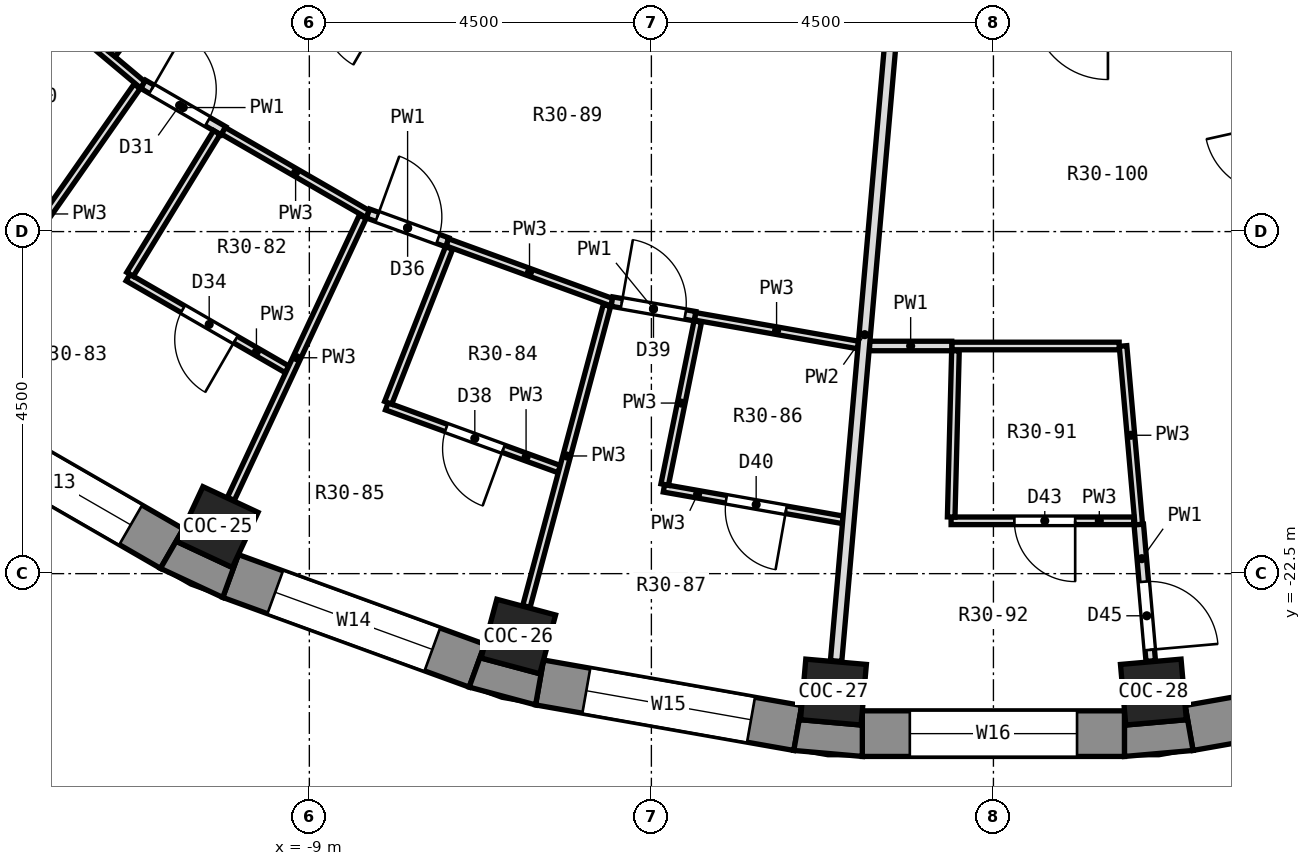
"""IFC4 building model, lengths in metres.
Left out: names, types, materials, properties, quantities, classifications, styles, units other than length and angle.
Written with IfcOpenShell. Run it as: python <this file> out.ifc"""

import sys

from ifc_helpers import new_model, si_unit, direction, frame, frame_2d, origin, origin_2d, place, context, subcontext, project, spatial, polyline, rectangle, outline, extrude, element, fill, save


model = new_model("IFC4")
c1 = context("Model", 3, precision=1e-05, world=origin(), true_north=direction((0.0, 1.0)))
c2 = subcontext(c1, "Body", "Model", "MODEL_VIEW")
j1 = project(units=[si_unit("LENGTHUNIT", "METRE"), si_unit("PLANEANGLEUNIT", "RADIAN")], contexts=[c1])
p1 = place(None, origin())
s1 = spatial("IfcSite", under=j1, at=p1, CompositionType="ELEMENT")
p2 = place(p1, origin())
s2 = spatial("IfcBuilding", under=s1, at=p2, CompositionType="ELEMENT")
p3 = place(p2, frame((0.0, 0.0, 210.3)))
s3 = spatial("IfcBuildingStorey", under=s2, at=p3, CompositionType="ELEMENT", Elevation=210.3)
for number, where, z_axis, x_axis in (
    (1, (-10.206, -21.887, 0.0), (0.0, 0.0, 1.0), (-0.423, -0.906, 0.0)),
    (2, (-6.25, -23.327, 0.0), (0.0, 0.0, 1.0), (-0.259, -0.966, 0.0)),
    (3, (-2.105, -24.058, 0.0), (0.0, 0.0, 1.0), (-0.087, -0.996, 0.0)),
    (4, (2.105, -24.058, 0.0), (0.0, 0.0, 1.0), (0.087, -0.996, 0.0)),
):
    element("IfcColumn", number, at=place(p3, frame(where, z_axis=z_axis, x_axis=x_axis)), inside=s3, PredefinedType="COLUMN", context=c2, shape_type="SweptSolid", body=[
        extrude(rectangle(XDim=0.8, YDim=0.8, at=origin_2d()), origin(), (0.0, 0.0, 1.0), 3.3),
    ])
p4 = place(p3, frame((-13.796, -20.446, 0.0), z_axis=(0.0, 0.0, 1.0), x_axis=(0.86602648383, -0.499998129301, 0.0)))
e5 = element("IfcWall", 5, at=p4, inside=s3, PredefinedType="SOLIDWALL", context=c2, shape_type="SweptSolid", body=[
    extrude(rectangle(XDim=3.45, YDim=0.6, at=frame_2d((1.725, 0.0))), origin(), (0.0, 0.0, 1.0), 2.85),
])
p5 = place(p4, frame((0.625, 0.0, 0.9)))
e6 = element("IfcOpeningElement", 6, at=p5, cuts=e5, PredefinedType="OPENING", context=c2, shape_type="SweptSolid", body=[
    extrude(rectangle(XDim=2.2, YDim=1.8, at=frame_2d((1.1, 0.9))), frame((0.0, 0.312, 0.0), z_axis=(0.0, -1.0, 0.0), x_axis=(1.0, 0.0, 0.0)), (0.0, 0.0, 1.0), 0.624),
])
p6 = place(p3, frame((-10.036, -22.531, 0.0), z_axis=(0.0, 0.0, 1.0), x_axis=(0.93968799822, -0.342032843455, 0.0)))
e7 = element("IfcWall", 7, at=p6, inside=s3, PredefinedType="SOLIDWALL", context=c2, shape_type="SweptSolid", body=[
    extrude(rectangle(XDim=3.45, YDim=0.6, at=frame_2d((1.725, 0.0))), origin(), (0.0, 0.0, 1.0), 2.85),
])
p7 = place(p6, frame((0.625, 0.0, 0.9)))
e8 = element("IfcOpeningElement", 8, at=p7, cuts=e7, PredefinedType="OPENING", context=c2, shape_type="SweptSolid", body=[
    extrude(rectangle(XDim=2.2, YDim=1.8, at=frame_2d((1.1, 0.9))), frame((0.0, 0.312, 0.0), z_axis=(0.0, -1.0, 0.0), x_axis=(1.0, 0.0, 0.0)), (0.0, 0.0, 1.0), 0.624),
])
p8 = place(p3, frame((-5.971, -23.932, 0.0), z_axis=(0.0, 0.0, 1.0), x_axis=(0.984814892183, -0.173607684551, 0.0)))
e9 = element("IfcWall", 9, at=p8, inside=s3, PredefinedType="SOLIDWALL", context=c2, shape_type="SweptSolid", body=[
    extrude(rectangle(XDim=3.45, YDim=0.6, at=frame_2d((1.725, 0.0))), origin(), (0.0, 0.0, 1.0), 2.85),
])
p9 = place(p8, frame((0.625, 0.0, 0.9)))
e10 = element("IfcOpeningElement", 10, at=p9, cuts=e9, PredefinedType="OPENING", context=c2, shape_type="SweptSolid", body=[
    extrude(rectangle(XDim=2.2, YDim=1.8, at=frame_2d((1.1, 0.9))), frame((0.0, 0.312, 0.0), z_axis=(0.0, -1.0, 0.0), x_axis=(1.0, 0.0, 0.0)), (0.0, 0.0, 1.0), 0.624),
])
p10 = place(p3, frame((-1.725, -24.605, 0.0), z_axis=(0.0, 0.0, 1.0), x_axis=(1.0, 0.0, 0.0)))
e11 = element("IfcWall", 11, at=p10, inside=s3, PredefinedType="SOLIDWALL", context=c2, shape_type="SweptSolid", body=[
    extrude(rectangle(XDim=3.45, YDim=0.6, at=frame_2d((1.725, 0.0))), origin(), (0.0, 0.0, 1.0), 2.85),
])
p11 = place(p10, frame((0.625, 0.0, 0.9)))
e12 = element("IfcOpeningElement", 12, at=p11, cuts=e11, PredefinedType="OPENING", context=c2, shape_type="SweptSolid", body=[
    extrude(rectangle(XDim=2.2, YDim=1.8, at=frame_2d((1.1, 0.9))), frame((0.0, 0.312, 0.0), z_axis=(0.0, -1.0, 0.0), x_axis=(1.0, 0.0, 0.0)), (0.0, 0.0, 1.0), 0.624),
])
p12 = place(p3, frame((2.574, -24.531, 0.0), z_axis=(0.0, 0.0, 1.0), x_axis=(0.984814892183, 0.173607684551, 0.0)))
e13 = element("IfcWall", 13, at=p12, inside=s3, PredefinedType="SOLIDWALL", context=c2, shape_type="SweptSolid", body=[
    extrude(rectangle(XDim=3.45, YDim=0.6, at=frame_2d((1.725, 0.0))), origin(), (0.0, 0.0, 1.0), 2.85),
])
p13 = place(p12, frame((0.625, 0.0, 0.9)))
e14 = element("IfcOpeningElement", 14, at=p13, cuts=e13, PredefinedType="OPENING", context=c2, shape_type="SweptSolid", body=[
    extrude(rectangle(XDim=2.2, YDim=1.8, at=frame_2d((1.1, 0.9))), frame((0.0, 0.312, 0.0), z_axis=(0.0, -1.0, 0.0), x_axis=(1.0, 0.0, 0.0)), (0.0, 0.0, 1.0), 0.624),
])
p14 = place(p3, origin())
e15 = element("IfcWall", 15, at=p14, inside=s3, PredefinedType="SOLIDWALL", context=c2, shape_type="SweptSolid", body=[
    extrude(outline(polyline([(-10.139, -22.813), (-9.934, -22.249), (-10.013, -22.419), (-10.738, -22.081), (-10.659, -21.911), (-10.959, -22.431), (-10.139, -22.813)])), origin(), (0.0, 0.0, 1.0), 2.85),
])
p15 = place(p3, origin())
e16 = element("IfcWall", 16, at=p15, inside=s3, PredefinedType="SOLIDWALL", context=c2, shape_type="SweptSolid", body=[
    extrude(outline(polyline([(-6.023, -24.227), (-5.919, -23.636), (-5.968, -23.817), (-6.74, -23.61), (-6.692, -23.429), (-6.897, -23.993), (-6.023, -24.227)])), origin(), (0.0, 0.0, 1.0), 2.85),
])
p16 = place(p3, origin())
e17 = element("IfcWall", 17, at=p16, inside=s3, PredefinedType="SOLIDWALL", context=c2, shape_type="SweptSolid", body=[
    extrude(outline(polyline([(-2.626, -24.826), (-1.725, -24.905), (-1.725, -24.305), (-1.741, -24.491), (-2.538, -24.422), (-2.522, -24.235), (-2.626, -24.826)])), origin(), (0.0, 0.0, 1.0), 2.85),
])
p17 = place(p3, origin())
e18 = element("IfcWall", 18, at=p17, inside=s3, PredefinedType="SOLIDWALL", context=c2, shape_type="SweptSolid", body=[
    extrude(outline(polyline([(1.725, -24.905), (2.626, -24.826), (2.522, -24.235), (2.538, -24.422), (1.741, -24.491), (1.725, -24.305), (1.725, -24.905)])), origin(), (0.0, 0.0, 1.0), 2.85),
])
p18 = place(p3, frame((1.705, -19.505, 0.0), z_axis=(0.0, 0.0, 1.0), x_axis=(0.087875685813, -0.996131449078, 0.0)))
e19 = element("IfcWall", 19, at=p18, inside=s3, PredefinedType="PARTITIONING", context=c2, shape_type="SweptSolid", body=[
    extrude(rectangle(XDim=2.359, YDim=0.1, at=frame_2d((1.179, 0.0))), origin(), (0.0, 0.0, 1.0), 2.85),
])
p19 = place(p3, frame((1.912, -21.855, 0.0), z_axis=(0.0, 0.0, 1.0), x_axis=(0.08726107822, -0.99618547682, 0.0)))
e20 = element("IfcWall", 20, at=p19, inside=s3, PredefinedType="PARTITIONING", context=c2, shape_type="SweptSolid", body=[
    extrude(rectangle(XDim=1.802, YDim=0.125, at=frame_2d((0.901, 0.0))), origin(), (0.0, 0.0, 1.0), 2.85),
])
p20 = place(p19, frame((0.754, 0.0, 0.0)))
e21 = element("IfcOpeningElement", 21, at=p20, cuts=e20, PredefinedType="OPENING", context=c2, shape_type="SweptSolid", body=[
    extrude(rectangle(XDim=0.9, YDim=2.1, at=frame_2d((0.45, 1.05))), frame((0.0, 0.074, 0.0), z_axis=(0.0, -1.0, 0.0), x_axis=(1.0, 0.0, 0.0)), (0.0, 0.0, 1.0), 0.149),
])
p21 = place(p3, frame((-12.957, -14.589, 0.0), z_axis=(0.0, 0.0, 1.0), x_axis=(0.766099024104, -0.642722556993, 0.0)))
e22 = element("IfcWall", 22, at=p21, inside=s3, PredefinedType="PARTITIONING", context=c2, shape_type="SweptSolid", body=[
    extrude(rectangle(XDim=2.305, YDim=0.1, at=frame_2d((1.153, 0.0))), origin(), (0.0, 0.0, 1.0), 2.85),
])
p22 = place(p3, frame((-11.186, -16.062, 0.0), z_axis=(0.0, 0.0, 1.0), x_axis=(0.865261949816, -0.501320015759, 0.0)))
e23 = element("IfcWall", 23, at=p22, inside=s3, PredefinedType="PARTITIONING", context=c2, shape_type="SweptSolid", body=[
    extrude(rectangle(XDim=1.221, YDim=0.125, at=frame_2d((0.61, 0.0))), origin(), (0.0, 0.0, 1.0), 2.85),
])
p23 = place(p22, frame((0.129, 0.0, 0.0)))
e24 = element("IfcOpeningElement", 24, at=p23, cuts=e23, PredefinedType="OPENING", context=c2, shape_type="SweptSolid", body=[
    extrude(rectangle(XDim=0.85, YDim=2.1, at=frame_2d((0.425, 1.05))), frame((0.0, 0.074, 0.0), z_axis=(0.0, -1.0, 0.0), x_axis=(1.0, 0.0, 0.0)), (0.0, 0.0, 1.0), 0.149),
])
p24 = place(p3, frame((-11.385, -18.605, 0.0), z_axis=(0.0, 0.0, 1.0), x_axis=(0.866145191815, -0.499792463624, 0.0)))
e25 = element("IfcWall", 25, at=p24, inside=s3, PredefinedType="PARTITIONING", context=c2, shape_type="SweptSolid", body=[
    extrude(rectangle(XDim=2.415, YDim=0.1, at=frame_2d((1.208, 0.0))), origin(), (0.0, 0.0, 1.0), 2.85),
])
p25 = place(p24, frame((0.833, 0.0, 0.0)))
e26 = element("IfcOpeningElement", 26, at=p25, cuts=e25, PredefinedType="OPENING", context=c2, shape_type="SweptSolid", body=[
    extrude(rectangle(XDim=0.8, YDim=2.1, at=frame_2d((0.4, 1.05))), frame((0.0, 0.062, 0.0), z_axis=(0.0, -1.0, 0.0), x_axis=(1.0, 0.0, 0.0)), (0.0, 0.0, 1.0), 0.124),
])
p26 = place(p3, frame((-10.13, -16.674, 0.0), z_axis=(0.0, 0.0, 1.0), x_axis=(0.866104006239, -0.499863831834, 0.0)))
e27 = element("IfcWall", 27, at=p26, inside=s3, PredefinedType="PARTITIONING", context=c2, shape_type="SweptSolid", body=[
    extrude(rectangle(XDim=2.192, YDim=0.1, at=frame_2d((1.096, 0.0))), origin(), (0.0, 0.0, 1.0), 2.85),
])
p27 = place(p3, frame((-7.981, -20.299, 0.0), z_axis=(0.0, 0.0, 1.0), x_axis=(0.939692991858, -0.342019123812, 0.0)))
e28 = element("IfcWall", 28, at=p27, inside=s3, PredefinedType="PARTITIONING", context=c2, shape_type="SweptSolid", body=[
    extrude(rectangle(XDim=2.414, YDim=0.1, at=frame_2d((1.207, 0.0))), origin(), (0.0, 0.0, 1.0), 2.85),
])
p28 = place(p27, frame((0.832, 0.0, 0.0)))
e29 = element("IfcOpeningElement", 29, at=p28, cuts=e28, PredefinedType="OPENING", context=c2, shape_type="SweptSolid", body=[
    extrude(rectangle(XDim=0.8, YDim=2.1, at=frame_2d((0.4, 1.05))), frame((0.0, 0.062, 0.0), z_axis=(0.0, -1.0, 0.0), x_axis=(1.0, 0.0, 0.0)), (0.0, 0.0, 1.0), 0.124),
])
p29 = place(p3, frame((-7.186, -18.141, 0.0), z_axis=(0.0, 0.0, 1.0), x_axis=(0.939651079277, -0.342134256123, 0.0)))
e30 = element("IfcWall", 30, at=p29, inside=s3, PredefinedType="PARTITIONING", context=c2, shape_type="SweptSolid", body=[
    extrude(rectangle(XDim=2.305, YDim=0.1, at=frame_2d((1.152, 0.0))), origin(), (0.0, 0.0, 1.0), 2.85),
])
p30 = place(p3, frame((-8.228, -17.762, 0.0), z_axis=(0.0, 0.0, 1.0), x_axis=(0.939793423488, -0.341743063087, 0.0)))
e31 = element("IfcWall", 31, at=p30, inside=s3, PredefinedType="PARTITIONING", context=c2, shape_type="SweptSolid", body=[
    extrude(rectangle(XDim=1.109, YDim=0.125, at=frame_2d((0.554, 0.0))), origin(), (0.0, 0.0, 1.0), 2.85),
])
p31 = place(p30, frame((0.129, 0.0, 0.0)))
e32 = element("IfcOpeningElement", 32, at=p31, cuts=e31, PredefinedType="OPENING", context=c2, shape_type="SweptSolid", body=[
    extrude(rectangle(XDim=0.85, YDim=2.1, at=frame_2d((0.425, 1.05))), frame((0.0, 0.074, 0.0), z_axis=(0.0, -1.0, 0.0), x_axis=(1.0, 0.0, 0.0)), (0.0, 0.0, 1.0), 0.149),
])
p32 = place(p3, frame((-4.335, -21.377, 0.0), z_axis=(0.0, 0.0, 1.0), x_axis=(0.984797956456, -0.173703727534, 0.0)))
e33 = element("IfcWall", 33, at=p32, inside=s3, PredefinedType="PARTITIONING", context=c2, shape_type="SweptSolid", body=[
    extrude(rectangle(XDim=2.389, YDim=0.1, at=frame_2d((1.195, 0.0))), origin(), (0.0, 0.0, 1.0), 2.85),
])
p33 = place(p32, frame((0.832, 0.0, 0.0)))
e34 = element("IfcOpeningElement", 34, at=p33, cuts=e33, PredefinedType="OPENING", context=c2, shape_type="SweptSolid", body=[
    extrude(rectangle(XDim=0.8, YDim=2.1, at=frame_2d((0.4, 1.05))), frame((0.0, 0.062, 0.0), z_axis=(0.0, -1.0, 0.0), x_axis=(1.0, 0.0, 0.0)), (0.0, 0.0, 1.0), 0.124),
])
p34 = place(p3, frame((-3.927, -19.115, 0.0), z_axis=(0.0, 0.0, 1.0), x_axis=(0.984911838823, -0.173056839643, 0.0)))
e35 = element("IfcWall", 35, at=p34, inside=s3, PredefinedType="PARTITIONING", context=c2, shape_type="SweptSolid", body=[
    extrude(rectangle(XDim=2.18, YDim=0.1, at=frame_2d((1.09, 0.0))), origin(), (0.0, 0.0, 1.0), 2.85),
])
p35 = place(p3, frame((-5.019, -18.921, 0.0), z_axis=(0.0, 0.0, 1.0), x_axis=(0.984810132848, -0.173634680406, 0.0)))
e36 = element("IfcWall", 36, at=p35, inside=s3, PredefinedType="PARTITIONING", context=c2, shape_type="SweptSolid", body=[
    extrude(rectangle(XDim=1.109, YDim=0.125, at=frame_2d((0.555, 0.0))), origin(), (0.0, 0.0, 1.0), 2.85),
])
p36 = place(p35, frame((0.13, 0.0, 0.0)))
e37 = element("IfcOpeningElement", 37, at=p36, cuts=e36, PredefinedType="OPENING", context=c2, shape_type="SweptSolid", body=[
    extrude(rectangle(XDim=0.85, YDim=2.1, at=frame_2d((0.425, 1.05))), frame((0.0, 0.074, 0.0), z_axis=(0.0, -1.0, 0.0), x_axis=(1.0, 0.0, 0.0)), (0.0, 0.0, 1.0), 0.149),
])
p37 = place(p3, frame((-0.557, -21.805, 0.0), z_axis=(0.0, 0.0, 1.0), x_axis=(1.0, 0.0, 0.0)))
e38 = element("IfcWall", 38, at=p37, inside=s3, PredefinedType="PARTITIONING", context=c2, shape_type="SweptSolid", body=[
    extrude(rectangle(XDim=2.402, YDim=0.1, at=frame_2d((1.201, 0.0))), origin(), (0.0, 0.0, 1.0), 2.85),
])
p38 = place(p37, frame((0.833, 0.0, 0.0)))
e39 = element("IfcOpeningElement", 39, at=p38, cuts=e38, PredefinedType="OPENING", context=c2, shape_type="SweptSolid", body=[
    extrude(rectangle(XDim=0.8, YDim=2.1, at=frame_2d((0.4, 1.05))), frame((0.0, 0.062, 0.0), z_axis=(0.0, -1.0, 0.0), x_axis=(1.0, 0.0, 0.0)), (0.0, 0.0, 1.0), 0.124),
])
p39 = place(p3, frame((-0.548, -19.505, 0.0), z_axis=(0.0, 0.0, 1.0), x_axis=(1.0, 0.0, 0.0)))
e40 = element("IfcWall", 40, at=p39, inside=s3, PredefinedType="PARTITIONING", context=c2, shape_type="SweptSolid", body=[
    extrude(rectangle(XDim=2.202, YDim=0.1, at=frame_2d((1.101, 0.0))), origin(), (0.0, 0.0, 1.0), 2.85),
])
p40 = place(p3, frame((-1.63, -19.505, 0.0), z_axis=(0.0, 0.0, 1.0), x_axis=(1.0, 0.0, 0.0)))
e41 = element("IfcWall", 41, at=p40, inside=s3, PredefinedType="PARTITIONING", context=c2, shape_type="SweptSolid", body=[
    extrude(rectangle(XDim=1.082, YDim=0.125, at=frame_2d((0.541, 0.0))), origin(), (0.0, 0.0, 1.0), 2.85),
])
p41 = place(p3, frame((-11.593, -15.667, 0.0), z_axis=(0.0, 0.0, 1.0), x_axis=(0.594790535758, 0.803880724096, 0.0)))
e42 = element("IfcWall", 42, at=p41, inside=s3, PredefinedType="PARTITIONING", context=c2, shape_type="SweptSolid", body=[
    extrude(rectangle(XDim=4.33, YDim=0.1, at=frame_2d((2.165, 0.0))), origin(), (0.0, 0.0, 1.0), 2.85),
])
p42 = place(p41, frame((1.421, 0.0, 0.0)))
e43 = element("IfcOpeningElement", 43, at=p42, cuts=e42, PredefinedType="OPENING", context=c2, shape_type="SweptSolid", body=[
    extrude(rectangle(XDim=0.9, YDim=2.1, at=frame_2d((0.45, 1.05))), frame((0.0, 0.062, 0.0), z_axis=(0.0, -1.0, 0.0), x_axis=(1.0, 0.0, 0.0)), (0.0, 0.0, 1.0), 0.124),
])
p43 = place(p3, frame((-13.617, -19.447, 0.0), z_axis=(0.0, 0.0, 1.0), x_axis=(0.573606249772, 0.819131167898, 0.0)))
e44 = element("IfcWall", 44, at=p43, inside=s3, PredefinedType="PARTITIONING", context=c2, shape_type="SweptSolid", body=[
    extrude(rectangle(XDim=4.099, YDim=0.1, at=frame_2d((2.049, 0.0))), origin(), (0.0, 0.0, 1.0), 2.85),
])
p44 = place(p3, frame((-11.359, -18.562, 0.0), z_axis=(0.0, 0.0, 1.0), x_axis=(0.522122387349, 0.852870572026, 0.0)))
e45 = element("IfcWall", 45, at=p44, inside=s3, PredefinedType="PARTITIONING", context=c2, shape_type="SweptSolid", body=[
    extrude(rectangle(XDim=2.188, YDim=0.1, at=frame_2d((1.094, 0.0))), origin(), (0.0, 0.0, 1.0), 2.85),
])
p45 = place(p3, frame((-10.032, -21.516, 0.0), z_axis=(0.0, 0.0, 1.0), x_axis=(0.423514808753, 0.90588918018, 0.0)))
e46 = element("IfcWall", 46, at=p45, inside=s3, PredefinedType="PARTITIONING", context=c2, shape_type="SweptSolid", body=[
    extrude(rectangle(XDim=4.098, YDim=0.1, at=frame_2d((2.049, 0.0))), origin(), (0.0, 0.0, 1.0), 2.85),
])
p46 = place(p3, frame((-7.963, -20.252, 0.0), z_axis=(0.0, 0.0, 1.0), x_axis=(0.365959579046, 0.930630746593, 0.0)))
e47 = element("IfcWall", 47, at=p46, inside=s3, PredefinedType="PARTITIONING", context=c2, shape_type="SweptSolid", body=[
    extrude(rectangle(XDim=2.188, YDim=0.1, at=frame_2d((1.094, 0.0))), origin(), (0.0, 0.0, 1.0), 2.85),
])
p47 = place(p3, frame((-6.144, -22.931, 0.0), z_axis=(0.0, 0.0, 1.0), x_axis=(0.258608038295, 0.965982340692, 0.0)))
e48 = element("IfcWall", 48, at=p47, inside=s3, PredefinedType="PARTITIONING", context=c2, shape_type="SweptSolid", body=[
    extrude(rectangle(XDim=4.098, YDim=0.1, at=frame_2d((2.049, 0.0))), origin(), (0.0, 0.0, 1.0), 2.85),
])
p48 = place(p3, frame((-4.325, -21.328, 0.0), z_axis=(0.0, 0.0, 1.0), x_axis=(0.199033137994, 0.979992760167, 0.0)))
e49 = element("IfcWall", 49, at=p48, inside=s3, PredefinedType="PARTITIONING", context=c2, shape_type="SweptSolid", body=[
    extrude(rectangle(XDim=2.188, YDim=0.1, at=frame_2d((1.094, 0.0))), origin(), (0.0, 0.0, 1.0), 2.85),
])
p49 = place(p3, frame((-2.07, -23.65, 0.0), z_axis=(0.0, 0.0, 1.0), x_axis=(0.087486308122, 0.996165722102, 0.0)))
e50 = element("IfcWall", 50, at=p49, inside=s3, PredefinedType="PARTITIONING", context=c2, shape_type="SweptSolid", body=[
    extrude(rectangle(XDim=8.62, YDim=0.15, at=frame_2d((4.31, 0.0))), origin(), (0.0, 0.0, 1.0), 2.85),
])
p50 = place(p3, frame((-0.556, -21.755, 0.0), z_axis=(0.0, 0.0, 1.0), x_axis=(0.025658328011, 0.999670770906, 0.0)))
e51 = element("IfcWall", 51, at=p50, inside=s3, PredefinedType="PARTITIONING", context=c2, shape_type="SweptSolid", body=[
    extrude(rectangle(XDim=2.188, YDim=0.1, at=frame_2d((1.094, 0.0))), origin(), (0.0, 0.0, 1.0), 2.85),
])
p51 = place(p5, origin())
e52 = element("IfcWindow", 52, at=p51, inside=s3, PartitioningType="SINGLE_PANEL", PredefinedType="WINDOW", context=c2, shape_type="SweptSolid", body=[
    extrude(rectangle(XDim=2.2, YDim=1.8, at=frame_2d((1.1, 0.9))), frame((0.0, 0.18, 0.0), z_axis=(0.0, -1.0, 0.0), x_axis=(1.0, 0.0, 0.0)), (0.0, 0.0, 1.0), 0.06),
])
fill(e6, e52)
p52 = place(p7, origin())
e53 = element("IfcWindow", 53, at=p52, inside=s3, PartitioningType="SINGLE_PANEL", PredefinedType="WINDOW", context=c2, shape_type="SweptSolid", body=[
    extrude(rectangle(XDim=2.2, YDim=1.8, at=frame_2d((1.1, 0.9))), frame((0.0, 0.18, 0.0), z_axis=(0.0, -1.0, 0.0), x_axis=(1.0, 0.0, 0.0)), (0.0, 0.0, 1.0), 0.06),
])
fill(e8, e53)
p53 = place(p9, origin())
e54 = element("IfcWindow", 54, at=p53, inside=s3, PartitioningType="SINGLE_PANEL", PredefinedType="WINDOW", context=c2, shape_type="SweptSolid", body=[
    extrude(rectangle(XDim=2.2, YDim=1.8, at=frame_2d((1.1, 0.9))), frame((0.0, 0.18, 0.0), z_axis=(0.0, -1.0, 0.0), x_axis=(1.0, 0.0, 0.0)), (0.0, 0.0, 1.0), 0.06),
])
fill(e10, e54)
p54 = place(p11, origin())
e55 = element("IfcWindow", 55, at=p54, inside=s3, PartitioningType="SINGLE_PANEL", PredefinedType="WINDOW", context=c2, shape_type="SweptSolid", body=[
    extrude(rectangle(XDim=2.2, YDim=1.8, at=frame_2d((1.1, 0.9))), frame((0.0, 0.18, 0.0), z_axis=(0.0, -1.0, 0.0), x_axis=(1.0, 0.0, 0.0)), (0.0, 0.0, 1.0), 0.06),
])
fill(e12, e55)
p55 = place(p23, origin())
e56 = element("IfcDoor", 56, at=p55, inside=s3, OperationType="SINGLE_SWING_LEFT", PredefinedType="DOOR", context=c2, shape_type="SweptSolid", body=[
    extrude(rectangle(XDim=0.85, YDim=2.1, at=frame_2d((0.425, 1.05))), frame((0.0, 0.025, 0.0), z_axis=(0.0, -1.0, 0.0), x_axis=(1.0, 0.0, 0.0)), (0.0, 0.0, 1.0), 0.05),
])
fill(e24, e56)
p56 = place(p25, frame((0.8, 0.0, 0.0), z_axis=(0.0, 0.0, 1.0), x_axis=(-1.0, 0.0, 0.0)))
e57 = element("IfcDoor", 57, at=p56, inside=s3, OperationType="SINGLE_SWING_LEFT", PredefinedType="DOOR", context=c2, shape_type="SweptSolid", body=[
    extrude(rectangle(XDim=0.8, YDim=2.1, at=frame_2d((0.4, 1.05))), frame((0.0, 0.025, 0.0), z_axis=(0.0, -1.0, 0.0), x_axis=(1.0, 0.0, 0.0)), (0.0, 0.0, 1.0), 0.05),
])
fill(e26, e57)
p57 = place(p31, origin())
e58 = element("IfcDoor", 58, at=p57, inside=s3, OperationType="SINGLE_SWING_LEFT", PredefinedType="DOOR", context=c2, shape_type="SweptSolid", body=[
    extrude(rectangle(XDim=0.85, YDim=2.1, at=frame_2d((0.425, 1.05))), frame((0.0, 0.025, 0.0), z_axis=(0.0, -1.0, 0.0), x_axis=(1.0, 0.0, 0.0)), (0.0, 0.0, 1.0), 0.05),
])
fill(e32, e58)
p58 = place(p28, frame((0.8, 0.0, 0.0), z_axis=(0.0, 0.0, 1.0), x_axis=(-1.0, 0.0, 0.0)))
e59 = element("IfcDoor", 59, at=p58, inside=s3, OperationType="SINGLE_SWING_LEFT", PredefinedType="DOOR", context=c2, shape_type="SweptSolid", body=[
    extrude(rectangle(XDim=0.8, YDim=2.1, at=frame_2d((0.4, 1.05))), frame((0.0, 0.025, 0.0), z_axis=(0.0, -1.0, 0.0), x_axis=(1.0, 0.0, 0.0)), (0.0, 0.0, 1.0), 0.05),
])
fill(e29, e59)
p59 = place(p36, origin())
e60 = element("IfcDoor", 60, at=p59, inside=s3, OperationType="SINGLE_SWING_LEFT", PredefinedType="DOOR", context=c2, shape_type="SweptSolid", body=[
    extrude(rectangle(XDim=0.85, YDim=2.1, at=frame_2d((0.425, 1.05))), frame((0.0, 0.025, 0.0), z_axis=(0.0, -1.0, 0.0), x_axis=(1.0, 0.0, 0.0)), (0.0, 0.0, 1.0), 0.05),
])
fill(e37, e60)
p60 = place(p33, frame((0.8, 0.0, 0.0), z_axis=(0.0, 0.0, 1.0), x_axis=(-1.0, 0.0, 0.0)))
e61 = element("IfcDoor", 61, at=p60, inside=s3, OperationType="SINGLE_SWING_LEFT", PredefinedType="DOOR", context=c2, shape_type="SweptSolid", body=[
    extrude(rectangle(XDim=0.8, YDim=2.1, at=frame_2d((0.4, 1.05))), frame((0.0, 0.025, 0.0), z_axis=(0.0, -1.0, 0.0), x_axis=(1.0, 0.0, 0.0)), (0.0, 0.0, 1.0), 0.05),
])
fill(e34, e61)
p61 = place(p38, frame((0.8, 0.0, 0.0), z_axis=(0.0, 0.0, 1.0), x_axis=(-1.0, 0.0, 0.0)))
e62 = element("IfcDoor", 62, at=p61, inside=s3, OperationType="SINGLE_SWING_LEFT", PredefinedType="DOOR", context=c2, shape_type="SweptSolid", body=[
    extrude(rectangle(XDim=0.8, YDim=2.1, at=frame_2d((0.4, 1.05))), frame((0.0, 0.025, 0.0), z_axis=(0.0, -1.0, 0.0), x_axis=(1.0, 0.0, 0.0)), (0.0, 0.0, 1.0), 0.05),
])
fill(e39, e62)
p62 = place(p20, origin())
e63 = element("IfcDoor", 63, at=p62, inside=s3, OperationType="SINGLE_SWING_RIGHT", PredefinedType="DOOR", context=c2, shape_type="SweptSolid", body=[
    extrude(rectangle(XDim=0.9, YDim=2.1, at=frame_2d((0.45, 1.05))), frame((0.0, 0.025, 0.0), z_axis=(0.0, -1.0, 0.0), x_axis=(1.0, 0.0, 0.0)), (0.0, 0.0, 1.0), 0.05),
])
fill(e21, e63)
save(model, sys.argv[1])
